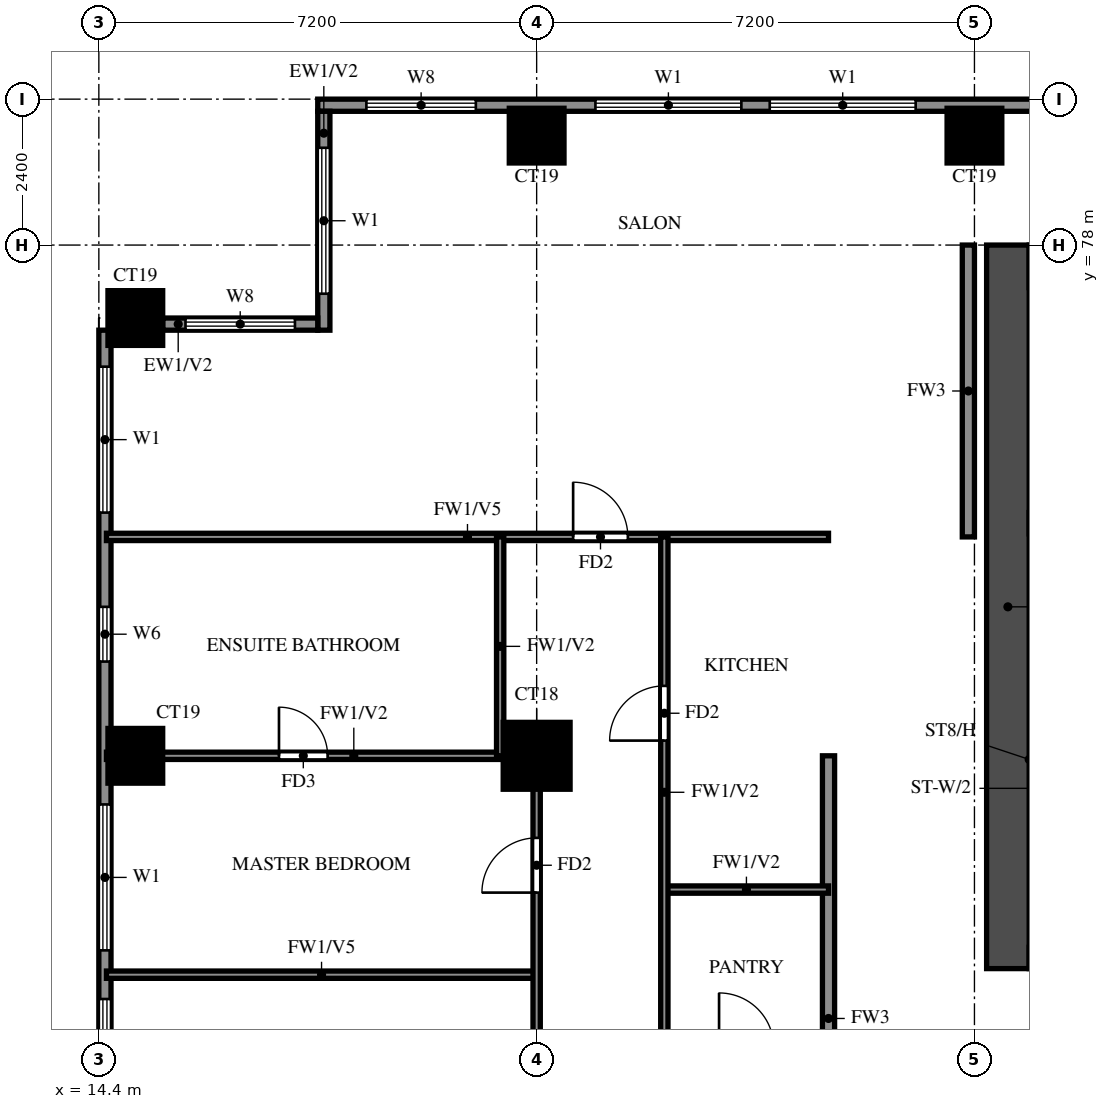
"""IFC4 building model, lengths in metres.
Left out: names, types, materials, properties, quantities, classifications, styles, units other than length and angle.
Written with IfcOpenShell. Run it as: python <this file> out.ifc"""

import sys

from ifc_helpers import new_model, si_unit, direction, frame, frame_2d, origin, origin_2d, place, context, subcontext, project, spatial, rectangle, extrude, source, transform, mapped, element, fill, save


model = new_model("IFC4")
c1 = context("Model", 3, precision=1e-05, world=origin(), true_north=direction((0.0, 1.0)))
c2 = subcontext(c1, "Body", "Model", "MODEL_VIEW")
j1 = project(units=[si_unit("LENGTHUNIT", "METRE"), si_unit("PLANEANGLEUNIT", "RADIAN")], contexts=[c1])
p1 = place(None, origin())
s1 = spatial("IfcSite", under=j1, at=p1, CompositionType="ELEMENT")
p2 = place(p1, origin())
s2 = spatial("IfcBuilding", under=s1, at=p2, CompositionType="ELEMENT")
p3 = place(p2, frame((0.0, 0.0, 116.5)))
s3 = spatial("IfcBuildingStorey", under=s2, at=p3, CompositionType="ELEMENT", Elevation=116.5)
m1 = source(origin(), c2, "Body", "SweptSolid", [
    extrude(rectangle(XDim=0.9, YDim=0.9, at=origin_2d()), origin(), (0.0, 0.0, 1.0), 3.2),
])
p4 = place(p3, frame((15.0, 69.6, 0.0), z_axis=(0.0, 0.0, 1.0), x_axis=(1.0, 0.0, 0.0)))
e1 = element("IfcColumn", 1, at=p4, inside=s3, PredefinedType="COLUMN", context=c2, shape_type="MappedRepresentation", body=[
    mapped(m1, transform((0.0, 0.0, 0.0))),
])
m2 = source(origin(), c2, "Body", "SweptSolid", [
    extrude(rectangle(XDim=1.1, YDim=1.1, at=origin_2d()), origin(), (0.0, 0.0, 1.0), 3.2),
])
p5 = place(p3, frame((21.6, 69.6, 0.0), z_axis=(0.0, 0.0, 1.0), x_axis=(1.0, 0.0, 0.0)))
e2 = element("IfcColumn", 2, at=p5, inside=s3, PredefinedType="COLUMN", context=c2, shape_type="MappedRepresentation", body=[
    mapped(m2, transform((0.0, 0.0, 0.0))),
])
for number, where, z_axis, x_axis in (
    (3, (15.0, 76.8, 0.0), (0.0, 0.0, 1.0), (1.0, 0.0, 0.0)),
    (4, (21.6, 79.8, 0.0), (0.0, 0.0, 1.0), (1.0, 0.0, 0.0)),
    (5, (28.8, 79.8, 0.0), (0.0, 0.0, 1.0), (1.0, 0.0, 0.0)),
):
    element("IfcColumn", number, at=place(p3, frame(where, z_axis=z_axis, x_axis=x_axis)), inside=s3, PredefinedType="COLUMN", context=c2, shape_type="MappedRepresentation", body=[
        mapped(m1, transform((0.0, 0.0, 0.0))),
    ])
p6 = place(p3, frame((29.35, 66.1, 0.0), z_axis=(0.0, 0.0, 1.0), x_axis=(0.0, 1.0, 0.0)))
e6 = element("IfcWall", 6, at=p6, inside=s3, PredefinedType="SHEAR", context=c2, shape_type="SweptSolid", body=[
    extrude(rectangle(XDim=11.9, YDim=0.7, at=frame_2d((5.95, 0.0))), origin(), (0.0, 0.0, 1.0), 3.2),
])
p7 = place(p3, frame((72.0, 80.3, 0.0), z_axis=(0.0, 0.0, 1.0), x_axis=(-1.0, 0.0, 0.0)))
e7 = element("IfcWall", 7, at=p7, inside=s3, PredefinedType="SOLIDWALL", context=c2, shape_type="SweptSolid", body=[
    extrude(rectangle(XDim=54.0, YDim=0.2, at=frame_2d((27.0, 0.0))), origin(), (0.0, 0.0, 1.0), 3.2),
])
p8 = place(p7, frame((44.167, 0.0, 0.6)))
e8 = element("IfcOpeningElement", 8, at=p8, cuts=e7, PredefinedType="OPENING", context=c2, shape_type="SweptSolid", body=[
    extrude(rectangle(XDim=2.4, YDim=2.4, at=frame_2d((1.2, 1.2))), frame((0.0, 0.11, 0.0), z_axis=(0.0, -1.0, 0.0), x_axis=(1.0, 0.0, 0.0)), (0.0, 0.0, 1.0), 0.22),
])
p9 = place(p7, frame((47.033, 0.0, 0.6)))
e9 = element("IfcOpeningElement", 9, at=p9, cuts=e7, PredefinedType="OPENING", context=c2, shape_type="SweptSolid", body=[
    extrude(rectangle(XDim=2.4, YDim=2.4, at=frame_2d((1.2, 1.2))), frame((0.0, 0.11, 0.0), z_axis=(0.0, -1.0, 0.0), x_axis=(1.0, 0.0, 0.0)), (0.0, 0.0, 1.0), 0.22),
])
p10 = place(p7, frame((51.4, 0.0, 0.6)))
e10 = element("IfcOpeningElement", 10, at=p10, cuts=e7, PredefinedType="OPENING", context=c2, shape_type="SweptSolid", body=[
    extrude(rectangle(XDim=1.8, YDim=2.4, at=frame_2d((0.9, 1.2))), frame((0.0, 0.11, 0.0), z_axis=(0.0, -1.0, 0.0), x_axis=(1.0, 0.0, 0.0)), (0.0, 0.0, 1.0), 0.22),
])
p11 = place(p3, frame((18.1, 80.2, 0.0), z_axis=(0.0, 0.0, 1.0), x_axis=(0.0, -1.0, 0.0)))
e11 = element("IfcWall", 11, at=p11, inside=s3, PredefinedType="SOLIDWALL", context=c2, shape_type="SweptSolid", body=[
    extrude(rectangle(XDim=3.6, YDim=0.2, at=frame_2d((1.8, 0.0))), origin(), (0.0, 0.0, 1.0), 3.2),
])
p12 = place(p11, frame((0.6, 0.0, 0.6)))
e12 = element("IfcOpeningElement", 12, at=p12, cuts=e11, PredefinedType="OPENING", context=c2, shape_type="SweptSolid", body=[
    extrude(rectangle(XDim=2.4, YDim=2.4, at=frame_2d((1.2, 1.2))), frame((0.0, 0.11, 0.0), z_axis=(0.0, -1.0, 0.0), x_axis=(1.0, 0.0, 0.0)), (0.0, 0.0, 1.0), 0.22),
])
p13 = place(p3, frame((18.0, 76.7, 0.0), z_axis=(0.0, 0.0, 1.0), x_axis=(-1.0, 0.0, 0.0)))
e13 = element("IfcWall", 13, at=p13, inside=s3, PredefinedType="SOLIDWALL", context=c2, shape_type="SweptSolid", body=[
    extrude(rectangle(XDim=2.55, YDim=0.2, at=frame_2d((1.275, 0.0))), origin(), (0.0, 0.0, 1.0), 3.2),
])
p14 = place(p13, frame((0.375, 0.0, 0.6)))
e14 = element("IfcOpeningElement", 14, at=p14, cuts=e13, PredefinedType="OPENING", context=c2, shape_type="SweptSolid", body=[
    extrude(rectangle(XDim=1.8, YDim=2.4, at=frame_2d((0.9, 1.2))), frame((0.0, 0.11, 0.0), z_axis=(0.0, -1.0, 0.0), x_axis=(1.0, 0.0, 0.0)), (0.0, 0.0, 1.0), 0.22),
])
p15 = place(p3, frame((14.5, 76.6, 0.0), z_axis=(0.0, 0.0, 1.0), x_axis=(0.0, -1.0, 0.0)))
e15 = element("IfcWall", 15, at=p15, inside=s3, PredefinedType="SOLIDWALL", context=c2, shape_type="SweptSolid", body=[
    extrude(rectangle(XDim=33.4, YDim=0.2, at=frame_2d((16.7, 0.0))), origin(), (0.0, 0.0, 1.0), 3.2),
])
p16 = place(p15, frame((29.9, 0.0, 0.6)))
e16 = element("IfcOpeningElement", 16, at=p16, cuts=e15, PredefinedType="OPENING", context=c2, shape_type="SweptSolid", body=[
    extrude(rectangle(XDim=2.4, YDim=2.4, at=frame_2d((1.2, 1.2))), frame((0.0, 0.11, 0.0), z_axis=(0.0, -1.0, 0.0), x_axis=(1.0, 0.0, 0.0)), (0.0, 0.0, 1.0), 0.22),
])
p17 = place(p15, frame((25.4, 0.0, 0.6)))
e17 = element("IfcOpeningElement", 17, at=p17, cuts=e15, PredefinedType="OPENING", context=c2, shape_type="SweptSolid", body=[
    extrude(rectangle(XDim=2.4, YDim=2.4, at=frame_2d((1.2, 1.2))), frame((0.0, 0.11, 0.0), z_axis=(0.0, -1.0, 0.0), x_axis=(1.0, 0.0, 0.0)), (0.0, 0.0, 1.0), 0.22),
])
p18 = place(p15, frame((18.2, 0.0, 0.6)))
e18 = element("IfcOpeningElement", 18, at=p18, cuts=e15, PredefinedType="OPENING", context=c2, shape_type="SweptSolid", body=[
    extrude(rectangle(XDim=2.4, YDim=2.4, at=frame_2d((1.2, 1.2))), frame((0.0, 0.11, 0.0), z_axis=(0.0, -1.0, 0.0), x_axis=(1.0, 0.0, 0.0)), (0.0, 0.0, 1.0), 0.22),
])
p19 = place(p15, frame((22.5, 0.0, 0.6)))
e19 = element("IfcOpeningElement", 19, at=p19, cuts=e15, PredefinedType="OPENING", context=c2, shape_type="SweptSolid", body=[
    extrude(rectangle(XDim=1.8, YDim=2.4, at=frame_2d((0.9, 1.2))), frame((0.0, 0.11, 0.0), z_axis=(0.0, -1.0, 0.0), x_axis=(1.0, 0.0, 0.0)), (0.0, 0.0, 1.0), 0.22),
])
p20 = place(p15, frame((15.3, 0.0, 0.6)))
e20 = element("IfcOpeningElement", 20, at=p20, cuts=e15, PredefinedType="OPENING", context=c2, shape_type="SweptSolid", body=[
    extrude(rectangle(XDim=1.8, YDim=2.4, at=frame_2d((0.9, 1.2))), frame((0.0, 0.11, 0.0), z_axis=(0.0, -1.0, 0.0), x_axis=(1.0, 0.0, 0.0)), (0.0, 0.0, 1.0), 0.22),
])
p21 = place(p15, frame((11.0, 0.0, 0.6)))
e21 = element("IfcOpeningElement", 21, at=p21, cuts=e15, PredefinedType="OPENING", context=c2, shape_type="SweptSolid", body=[
    extrude(rectangle(XDim=2.4, YDim=2.4, at=frame_2d((1.2, 1.2))), frame((0.0, 0.11, 0.0), z_axis=(0.0, -1.0, 0.0), x_axis=(1.0, 0.0, 0.0)), (0.0, 0.0, 1.0), 0.22),
])
p22 = place(p15, frame((7.8, 0.0, 0.6)))
e22 = element("IfcOpeningElement", 22, at=p22, cuts=e15, PredefinedType="OPENING", context=c2, shape_type="SweptSolid", body=[
    extrude(rectangle(XDim=2.4, YDim=2.4, at=frame_2d((1.2, 1.2))), frame((0.0, 0.11, 0.0), z_axis=(0.0, -1.0, 0.0), x_axis=(1.0, 0.0, 0.0)), (0.0, 0.0, 1.0), 0.22),
])
p23 = place(p15, frame((4.55, 0.0, 1.5)))
e23 = element("IfcOpeningElement", 23, at=p23, cuts=e15, PredefinedType="OPENING", context=c2, shape_type="SweptSolid", body=[
    extrude(rectangle(XDim=0.9, YDim=0.9, at=frame_2d((0.45, 0.45))), frame((0.0, 0.11, 0.0), z_axis=(0.0, -1.0, 0.0), x_axis=(1.0, 0.0, 0.0)), (0.0, 0.0, 1.0), 0.22),
])
p24 = place(p15, frame((0.6, 0.0, 0.6)))
e24 = element("IfcOpeningElement", 24, at=p24, cuts=e15, PredefinedType="OPENING", context=c2, shape_type="SweptSolid", body=[
    extrude(rectangle(XDim=2.4, YDim=2.4, at=frame_2d((1.2, 1.2))), frame((0.0, 0.11, 0.0), z_axis=(0.0, -1.0, 0.0), x_axis=(1.0, 0.0, 0.0)), (0.0, 0.0, 1.0), 0.22),
])
p25 = place(p3, frame((26.4, 60.0, 0.0), z_axis=(0.0, 0.0, 1.0), x_axis=(0.0, 1.0, 0.0)))
e25 = element("IfcWall", 25, at=p25, inside=s3, PredefinedType="SOLIDWALL", context=c2, shape_type="SweptSolid", body=[
    extrude(rectangle(XDim=9.6, YDim=0.2, at=frame_2d((4.8, 0.0))), origin(), (0.0, 0.0, 1.0), 3.2),
])
p26 = place(p25, frame((0.7, 0.0, 0.0)))
e26 = element("IfcOpeningElement", 26, at=p26, cuts=e25, PredefinedType="OPENING", context=c2, shape_type="SweptSolid", body=[
    extrude(rectangle(XDim=1.0, YDim=2.1, at=frame_2d((0.5, 1.05))), frame((0.0, 0.11, 0.0), z_axis=(0.0, -1.0, 0.0), x_axis=(1.0, 0.0, 0.0)), (0.0, 0.0, 1.0), 0.22),
])
p27 = place(p25, frame((3.1, 0.0, 0.0)))
e27 = element("IfcOpeningElement", 27, at=p27, cuts=e25, PredefinedType="OPENING", context=c2, shape_type="SweptSolid", body=[
    extrude(rectangle(XDim=1.0, YDim=2.1, at=frame_2d((0.5, 1.05))), frame((0.0, 0.11, 0.0), z_axis=(0.0, -1.0, 0.0), x_axis=(1.0, 0.0, 0.0)), (0.0, 0.0, 1.0), 0.22),
])
p28 = place(p3, frame((28.7, 73.2, 0.0), z_axis=(0.0, 0.0, 1.0), x_axis=(0.0, 1.0, 0.0)))
e28 = element("IfcWall", 28, at=p28, inside=s3, PredefinedType="SOLIDWALL", context=c2, shape_type="SweptSolid", body=[
    extrude(rectangle(XDim=4.8, YDim=0.2, at=frame_2d((2.4, 0.0))), origin(), (0.0, 0.0, 1.0), 3.2),
])
p29 = place(p3, frame((14.525, 66.0, 0.0), z_axis=(0.0, 0.0, 1.0), x_axis=(1.0, 0.0, 0.0)))
e29 = element("IfcWall", 29, at=p29, inside=s3, PredefinedType="PARTITIONING", context=c2, shape_type="SweptSolid", body=[
    extrude(rectangle(XDim=7.075, YDim=0.12, at=frame_2d((3.538, 0.0))), origin(), (0.0, 0.0, 1.0), 2.3),
])
p30 = place(p3, frame((23.7, 67.4, 0.0), z_axis=(0.0, 0.0, 1.0), x_axis=(1.0, 0.0, 0.0)))
e30 = element("IfcWall", 30, at=p30, inside=s3, PredefinedType="PARTITIONING", context=c2, shape_type="SweptSolid", body=[
    extrude(rectangle(XDim=2.7, YDim=0.12, at=frame_2d((1.35, 0.0))), origin(), (0.0, 0.0, 1.0), 3.2),
])
p31 = place(p3, frame((14.525, 69.6, 0.0), z_axis=(0.0, 0.0, 1.0), x_axis=(1.0, 0.0, 0.0)))
e31 = element("IfcWall", 31, at=p31, inside=s3, PredefinedType="PARTITIONING", context=c2, shape_type="SweptSolid", body=[
    extrude(rectangle(XDim=7.075, YDim=0.12, at=frame_2d((3.538, 0.0))), origin(), (0.0, 0.0, 1.0), 3.2),
])
p32 = place(p31, frame((2.837, 0.0, 0.0)))
e32 = element("IfcOpeningElement", 32, at=p32, cuts=e31, PredefinedType="OPENING", context=c2, shape_type="SweptSolid", body=[
    extrude(rectangle(XDim=0.8, YDim=2.1, at=frame_2d((0.4, 1.05))), frame((0.0, 0.07, 0.0), z_axis=(0.0, -1.0, 0.0), x_axis=(1.0, 0.0, 0.0)), (0.0, 0.0, 1.0), 0.14),
])
p33 = place(p3, frame((14.525, 73.2, 0.0), z_axis=(0.0, 0.0, 1.0), x_axis=(1.0, 0.0, 0.0)))
e33 = element("IfcWall", 33, at=p33, inside=s3, PredefinedType="PARTITIONING", context=c2, shape_type="SweptSolid", body=[
    extrude(rectangle(XDim=11.875, YDim=0.12, at=frame_2d((5.938, 0.0))), origin(), (0.0, 0.0, 1.0), 2.3),
])
p34 = place(p33, frame((7.675, 0.0, 0.0)))
e34 = element("IfcOpeningElement", 34, at=p34, cuts=e33, PredefinedType="OPENING", context=c2, shape_type="SweptSolid", body=[
    extrude(rectangle(XDim=0.9, YDim=2.1, at=frame_2d((0.45, 1.05))), frame((0.0, 0.07, 0.0), z_axis=(0.0, -1.0, 0.0), x_axis=(1.0, 0.0, 0.0)), (0.0, 0.0, 1.0), 0.14),
])
p35 = place(p3, frame((21.0, 69.6, 0.0), z_axis=(0.0, 0.0, 1.0), x_axis=(0.0, 1.0, 0.0)))
e35 = element("IfcWall", 35, at=p35, inside=s3, PredefinedType="PARTITIONING", context=c2, shape_type="SweptSolid", body=[
    extrude(rectangle(XDim=3.6, YDim=0.12, at=frame_2d((1.8, 0.0))), origin(), (0.0, 0.0, 1.0), 3.2),
])
p36 = place(p3, frame((21.6, 48.0, 0.0), z_axis=(0.0, 0.0, 1.0), x_axis=(0.0, 1.0, 0.0)))
e36 = element("IfcWall", 36, at=p36, inside=s3, PredefinedType="PARTITIONING", context=c2, shape_type="SweptSolid", body=[
    extrude(rectangle(XDim=21.6, YDim=0.12, at=frame_2d((10.8, 0.0))), origin(), (0.0, 0.0, 1.0), 3.2),
])
p37 = place(p36, frame((1.35, 0.0, 0.0)))
e37 = element("IfcOpeningElement", 37, at=p37, cuts=e36, PredefinedType="OPENING", context=c2, shape_type="SweptSolid", body=[
    extrude(rectangle(XDim=0.9, YDim=2.1, at=frame_2d((0.45, 1.05))), frame((0.0, 0.07, 0.0), z_axis=(0.0, -1.0, 0.0), x_axis=(1.0, 0.0, 0.0)), (0.0, 0.0, 1.0), 0.14),
])
p38 = place(p36, frame((7.95, 0.0, 0.0)))
e38 = element("IfcOpeningElement", 38, at=p38, cuts=e36, PredefinedType="OPENING", context=c2, shape_type="SweptSolid", body=[
    extrude(rectangle(XDim=1.5, YDim=2.1, at=frame_2d((0.75, 1.05))), frame((0.0, 0.07, 0.0), z_axis=(0.0, -1.0, 0.0), x_axis=(1.0, 0.0, 0.0)), (0.0, 0.0, 1.0), 0.14),
])
p39 = place(p36, frame((12.15, 0.0, 0.0)))
e39 = element("IfcOpeningElement", 39, at=p39, cuts=e36, PredefinedType="OPENING", context=c2, shape_type="SweptSolid", body=[
    extrude(rectangle(XDim=0.9, YDim=2.1, at=frame_2d((0.45, 1.05))), frame((0.0, 0.07, 0.0), z_axis=(0.0, -1.0, 0.0), x_axis=(1.0, 0.0, 0.0)), (0.0, 0.0, 1.0), 0.14),
])
p40 = place(p36, frame((15.75, 0.0, 0.0)))
e40 = element("IfcOpeningElement", 40, at=p40, cuts=e36, PredefinedType="OPENING", context=c2, shape_type="SweptSolid", body=[
    extrude(rectangle(XDim=0.9, YDim=2.1, at=frame_2d((0.45, 1.05))), frame((0.0, 0.07, 0.0), z_axis=(0.0, -1.0, 0.0), x_axis=(1.0, 0.0, 0.0)), (0.0, 0.0, 1.0), 0.14),
])
p41 = place(p36, frame((19.35, 0.0, 0.0)))
e41 = element("IfcOpeningElement", 41, at=p41, cuts=e36, PredefinedType="OPENING", context=c2, shape_type="SweptSolid", body=[
    extrude(rectangle(XDim=0.9, YDim=2.1, at=frame_2d((0.45, 1.05))), frame((0.0, 0.07, 0.0), z_axis=(0.0, -1.0, 0.0), x_axis=(1.0, 0.0, 0.0)), (0.0, 0.0, 1.0), 0.14),
])
p42 = place(p3, frame((23.7, 64.8, 0.0), z_axis=(0.0, 0.0, 1.0), x_axis=(0.0, 1.0, 0.0)))
e42 = element("IfcWall", 42, at=p42, inside=s3, PredefinedType="PARTITIONING", context=c2, shape_type="SweptSolid", body=[
    extrude(rectangle(XDim=8.4, YDim=0.12, at=frame_2d((4.2, 0.0))), origin(), (0.0, 0.0, 1.0), 3.2),
])
p43 = place(p42, frame((5.05, 0.0, 0.0)))
e43 = element("IfcOpeningElement", 43, at=p43, cuts=e42, PredefinedType="OPENING", context=c2, shape_type="SweptSolid", body=[
    extrude(rectangle(XDim=0.9, YDim=2.1, at=frame_2d((0.45, 1.05))), frame((0.0, 0.07, 0.0), z_axis=(0.0, -1.0, 0.0), x_axis=(1.0, 0.0, 0.0)), (0.0, 0.0, 1.0), 0.14),
])
p44 = place(p8, origin())
e44 = element("IfcWindow", 44, at=p44, inside=s3, PartitioningType="DOUBLE_PANEL_VERTICAL", PredefinedType="WINDOW", context=c2, shape_type="SweptSolid", body=[
    extrude(rectangle(XDim=2.4, YDim=2.4, at=frame_2d((1.2, 1.2))), frame((0.0, 0.03, 0.0), z_axis=(0.0, -1.0, 0.0), x_axis=(1.0, 0.0, 0.0)), (0.0, 0.0, 1.0), 0.06),
])
fill(e8, e44)
p45 = place(p9, origin())
e45 = element("IfcWindow", 45, at=p45, inside=s3, PartitioningType="DOUBLE_PANEL_VERTICAL", PredefinedType="WINDOW", context=c2, shape_type="SweptSolid", body=[
    extrude(rectangle(XDim=2.4, YDim=2.4, at=frame_2d((1.2, 1.2))), frame((0.0, 0.03, 0.0), z_axis=(0.0, -1.0, 0.0), x_axis=(1.0, 0.0, 0.0)), (0.0, 0.0, 1.0), 0.06),
])
fill(e9, e45)
p46 = place(p10, origin())
e46 = element("IfcWindow", 46, at=p46, inside=s3, PartitioningType="DOUBLE_PANEL_VERTICAL", PredefinedType="WINDOW", context=c2, shape_type="SweptSolid", body=[
    extrude(rectangle(XDim=1.8, YDim=2.4, at=frame_2d((0.9, 1.2))), frame((0.0, 0.03, 0.0), z_axis=(0.0, -1.0, 0.0), x_axis=(1.0, 0.0, 0.0)), (0.0, 0.0, 1.0), 0.06),
])
fill(e10, e46)
p47 = place(p12, origin())
e47 = element("IfcWindow", 47, at=p47, inside=s3, PartitioningType="DOUBLE_PANEL_VERTICAL", PredefinedType="WINDOW", context=c2, shape_type="SweptSolid", body=[
    extrude(rectangle(XDim=2.4, YDim=2.4, at=frame_2d((1.2, 1.2))), frame((0.0, 0.03, 0.0), z_axis=(0.0, -1.0, 0.0), x_axis=(1.0, 0.0, 0.0)), (0.0, 0.0, 1.0), 0.06),
])
fill(e12, e47)
p48 = place(p14, origin())
e48 = element("IfcWindow", 48, at=p48, inside=s3, PartitioningType="DOUBLE_PANEL_VERTICAL", PredefinedType="WINDOW", context=c2, shape_type="SweptSolid", body=[
    extrude(rectangle(XDim=1.8, YDim=2.4, at=frame_2d((0.9, 1.2))), frame((0.0, 0.03, 0.0), z_axis=(0.0, -1.0, 0.0), x_axis=(1.0, 0.0, 0.0)), (0.0, 0.0, 1.0), 0.06),
])
fill(e14, e48)
p49 = place(p21, origin())
e49 = element("IfcWindow", 49, at=p49, inside=s3, PartitioningType="DOUBLE_PANEL_VERTICAL", PredefinedType="WINDOW", context=c2, shape_type="SweptSolid", body=[
    extrude(rectangle(XDim=2.4, YDim=2.4, at=frame_2d((1.2, 1.2))), frame((0.0, 0.03, 0.0), z_axis=(0.0, -1.0, 0.0), x_axis=(1.0, 0.0, 0.0)), (0.0, 0.0, 1.0), 0.06),
])
fill(e21, e49)
p50 = place(p22, origin())
e50 = element("IfcWindow", 50, at=p50, inside=s3, PartitioningType="DOUBLE_PANEL_VERTICAL", PredefinedType="WINDOW", context=c2, shape_type="SweptSolid", body=[
    extrude(rectangle(XDim=2.4, YDim=2.4, at=frame_2d((1.2, 1.2))), frame((0.0, 0.03, 0.0), z_axis=(0.0, -1.0, 0.0), x_axis=(1.0, 0.0, 0.0)), (0.0, 0.0, 1.0), 0.06),
])
fill(e22, e50)
p51 = place(p23, origin())
e51 = element("IfcWindow", 51, at=p51, inside=s3, PartitioningType="SINGLE_PANEL", PredefinedType="WINDOW", context=c2, shape_type="SweptSolid", body=[
    extrude(rectangle(XDim=0.9, YDim=0.9, at=frame_2d((0.45, 0.45))), frame((0.0, 0.03, 0.0), z_axis=(0.0, -1.0, 0.0), x_axis=(1.0, 0.0, 0.0)), (0.0, 0.0, 1.0), 0.06),
])
fill(e23, e51)
p52 = place(p24, origin())
e52 = element("IfcWindow", 52, at=p52, inside=s3, PartitioningType="DOUBLE_PANEL_VERTICAL", PredefinedType="WINDOW", context=c2, shape_type="SweptSolid", body=[
    extrude(rectangle(XDim=2.4, YDim=2.4, at=frame_2d((1.2, 1.2))), frame((0.0, 0.03, 0.0), z_axis=(0.0, -1.0, 0.0), x_axis=(1.0, 0.0, 0.0)), (0.0, 0.0, 1.0), 0.06),
])
fill(e24, e52)
p53 = place(p41, origin())
e53 = element("IfcDoor", 53, at=p53, inside=s3, OperationType="SINGLE_SWING_LEFT", PredefinedType="DOOR", context=c2, shape_type="SweptSolid", body=[
    extrude(rectangle(XDim=0.9, YDim=2.1, at=frame_2d((0.45, 1.05))), frame((0.0, 0.025, 0.0), z_axis=(0.0, -1.0, 0.0), x_axis=(1.0, 0.0, 0.0)), (0.0, 0.0, 1.0), 0.05),
])
fill(e41, e53)
p54 = place(p32, origin())
e54 = element("IfcDoor", 54, at=p54, inside=s3, OperationType="SINGLE_SWING_RIGHT", PredefinedType="DOOR", context=c2, shape_type="SweptSolid", body=[
    extrude(rectangle(XDim=0.8, YDim=2.1, at=frame_2d((0.4, 1.05))), frame((0.0, 0.025, 0.0), z_axis=(0.0, -1.0, 0.0), x_axis=(1.0, 0.0, 0.0)), (0.0, 0.0, 1.0), 0.05),
])
fill(e32, e54)
p55 = place(p34, origin())
e55 = element("IfcDoor", 55, at=p55, inside=s3, OperationType="SINGLE_SWING_LEFT", PredefinedType="DOOR", context=c2, shape_type="SweptSolid", body=[
    extrude(rectangle(XDim=0.9, YDim=2.1, at=frame_2d((0.45, 1.05))), frame((0.0, 0.025, 0.0), z_axis=(0.0, -1.0, 0.0), x_axis=(1.0, 0.0, 0.0)), (0.0, 0.0, 1.0), 0.05),
])
fill(e34, e55)
p56 = place(p43, origin())
e56 = element("IfcDoor", 56, at=p56, inside=s3, OperationType="SINGLE_SWING_RIGHT", PredefinedType="DOOR", context=c2, shape_type="SweptSolid", body=[
    extrude(rectangle(XDim=0.9, YDim=2.1, at=frame_2d((0.45, 1.05))), frame((0.0, 0.025, 0.0), z_axis=(0.0, -1.0, 0.0), x_axis=(1.0, 0.0, 0.0)), (0.0, 0.0, 1.0), 0.05),
])
fill(e43, e56)
save(model, sys.argv[1])
